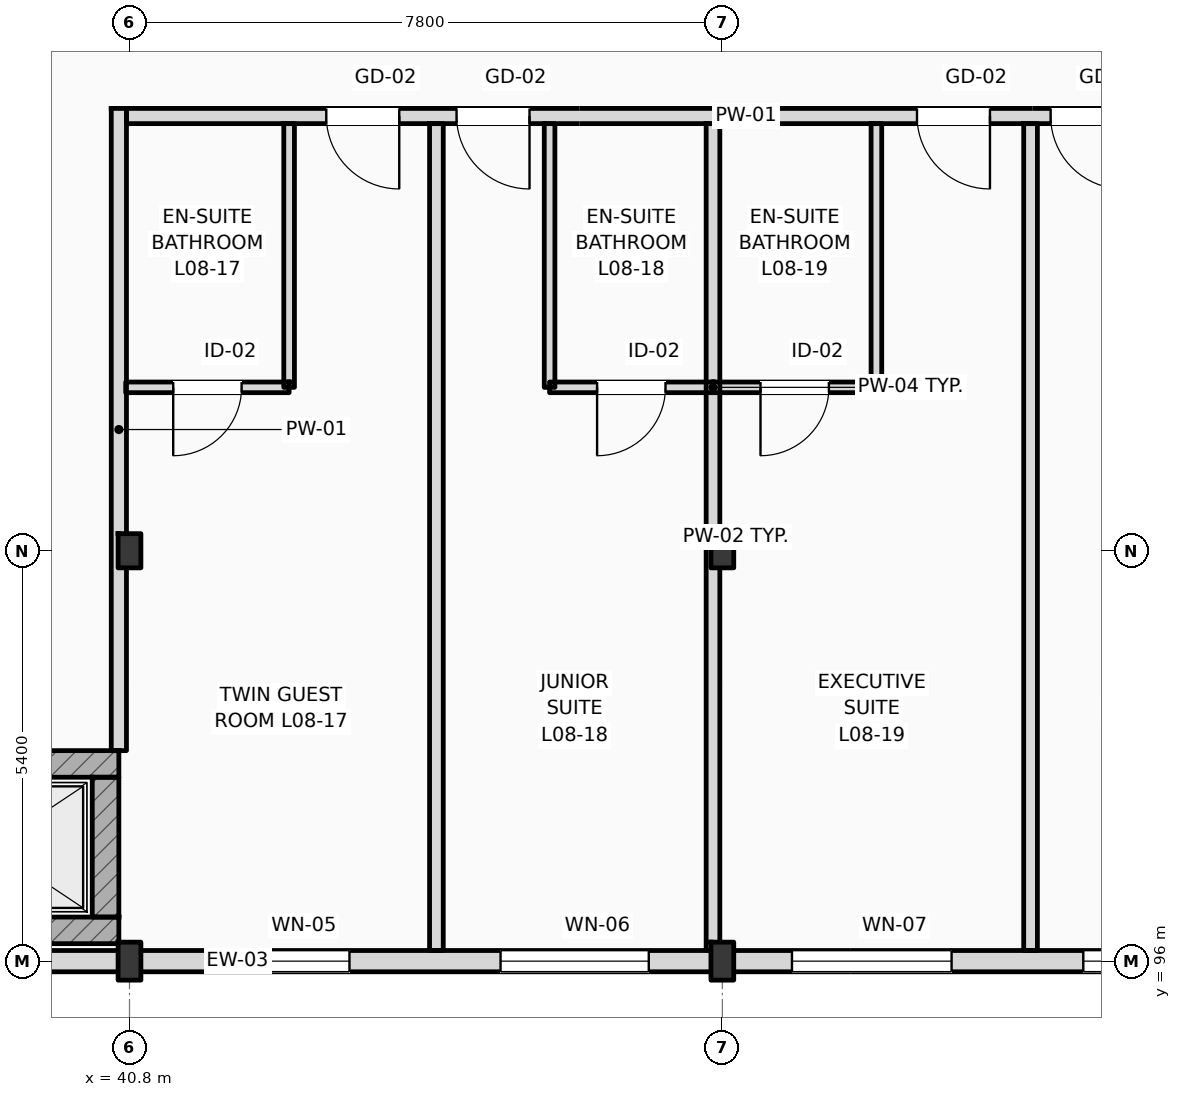
"""IFC4 building model, lengths in metres.
Left out: names, types, materials, properties, quantities, classifications, styles, units other than length and angle.
Written with IfcOpenShell. Run it as: python <this file> out.ifc"""

import sys

from ifc_helpers import new_model, si_unit, direction, frame, frame_2d, origin, origin_2d, place, context, subcontext, project, spatial, rectangle, i_section, extrude, element, fill, save


model = new_model("IFC4")
c1 = context("Model", 3, precision=1e-05, world=origin(), true_north=direction((0.0, 1.0)))
c2 = subcontext(c1, "Body", "Model", "MODEL_VIEW")
j1 = project(units=[si_unit("LENGTHUNIT", "METRE"), si_unit("PLANEANGLEUNIT", "RADIAN")], contexts=[c1])
p1 = place(None, origin())
s1 = spatial("IfcSite", under=j1, at=p1, CompositionType="ELEMENT")
p2 = place(p1, origin())
s2 = spatial("IfcBuilding", under=s1, at=p2, CompositionType="ELEMENT")
p3 = place(p2, frame((0.0, 0.0, 35.4)))
s3 = spatial("IfcBuildingStorey", under=s2, at=p3, CompositionType="ELEMENT", Elevation=35.4)
p4 = place(p3, frame((40.8, 96.0, 0.0), z_axis=(0.0, 0.0, 1.0), x_axis=(1.0, 0.0, 0.0)))
e1 = element("IfcColumn", 1, at=p4, inside=s3, PredefinedType="COLUMN", context=c2, shape_type="SweptSolid", body=[
    extrude(i_section(OverallWidth=0.3, OverallDepth=0.5, WebThickness=0.014, FlangeThickness=0.028, FilletRadius=0.027, at=origin_2d()), origin(), (0.0, 0.0, 1.0), 3.6),
])
p5 = place(p3, frame((40.8, 101.4, 0.0), z_axis=(0.0, 0.0, 1.0), x_axis=(1.0, 0.0, 0.0)))
e2 = element("IfcColumn", 2, at=p5, inside=s3, PredefinedType="COLUMN", context=c2, shape_type="SweptSolid", body=[
    extrude(i_section(OverallWidth=0.3, OverallDepth=0.45, WebThickness=0.014, FlangeThickness=0.026, FilletRadius=0.027, at=origin_2d()), origin(), (0.0, 0.0, 1.0), 3.6),
])
p6 = place(p3, frame((48.6, 96.0, 0.0), z_axis=(0.0, 0.0, 1.0), x_axis=(1.0, 0.0, 0.0)))
e3 = element("IfcColumn", 3, at=p6, inside=s3, PredefinedType="COLUMN", context=c2, shape_type="SweptSolid", body=[
    extrude(i_section(OverallWidth=0.3, OverallDepth=0.5, WebThickness=0.014, FlangeThickness=0.028, FilletRadius=0.027, at=origin_2d()), origin(), (0.0, 0.0, 1.0), 3.6),
])
p7 = place(p3, frame((48.6, 101.4, 0.0), z_axis=(0.0, 0.0, 1.0), x_axis=(1.0, 0.0, 0.0)))
e4 = element("IfcColumn", 4, at=p7, inside=s3, PredefinedType="COLUMN", context=c2, shape_type="SweptSolid", body=[
    extrude(i_section(OverallWidth=0.3, OverallDepth=0.45, WebThickness=0.014, FlangeThickness=0.026, FilletRadius=0.027, at=origin_2d()), origin(), (0.0, 0.0, 1.0), 3.6),
])
p8 = place(p3, frame((25.2, 96.0, 0.0), z_axis=(0.0, 0.0, 1.0), x_axis=(1.0, 0.0, 0.0)))
e5 = element("IfcWall", 5, at=p8, inside=s3, PredefinedType="STANDARD", context=c2, shape_type="SweptSolid", body=[
    extrude(rectangle(XDim=70.2, YDim=0.28, at=frame_2d((35.1, 0.0))), origin(), (0.0, 0.0, 1.0), 2.92),
])
p9 = place(p8, frame((16.694, 0.0, 0.9)))
e6 = element("IfcOpeningElement", 6, at=p9, cuts=e5, PredefinedType="OPENING", context=c2, shape_type="SweptSolid", body=[
    extrude(rectangle(XDim=1.8, YDim=1.84, at=frame_2d((0.9, 0.92))), frame((0.0, 0.15, 0.0), z_axis=(0.0, -1.0, 0.0), x_axis=(1.0, 0.0, 0.0)), (0.0, 0.0, 1.0), 0.3),
])
p10 = place(p8, frame((20.482, 0.0, 0.9)))
e7 = element("IfcOpeningElement", 7, at=p10, cuts=e5, PredefinedType="OPENING", context=c2, shape_type="SweptSolid", body=[
    extrude(rectangle(XDim=1.95, YDim=1.84, at=frame_2d((0.975, 0.92))), frame((0.0, 0.15, 0.0), z_axis=(0.0, -1.0, 0.0), x_axis=(1.0, 0.0, 0.0)), (0.0, 0.0, 1.0), 0.3),
])
p11 = place(p8, frame((24.316, 0.0, 0.9)))
e8 = element("IfcOpeningElement", 8, at=p11, cuts=e5, PredefinedType="OPENING", context=c2, shape_type="SweptSolid", body=[
    extrude(rectangle(XDim=2.1, YDim=1.84, at=frame_2d((1.05, 0.92))), frame((0.0, 0.15, 0.0), z_axis=(0.0, -1.0, 0.0), x_axis=(1.0, 0.0, 0.0)), (0.0, 0.0, 1.0), 0.3),
])
p12 = place(p8, frame((28.149, 0.0, 0.9)))
e9 = element("IfcOpeningElement", 9, at=p12, cuts=e5, PredefinedType="OPENING", context=c2, shape_type="SweptSolid", body=[
    extrude(rectangle(XDim=2.25, YDim=1.84, at=frame_2d((1.125, 0.92))), frame((0.0, 0.15, 0.0), z_axis=(0.0, -1.0, 0.0), x_axis=(1.0, 0.0, 0.0)), (0.0, 0.0, 1.0), 0.3),
])
p13 = place(p8, frame((31.983, 0.0, 0.9)))
e10 = element("IfcOpeningElement", 10, at=p13, cuts=e5, PredefinedType="OPENING", context=c2, shape_type="SweptSolid", body=[
    extrude(rectangle(XDim=2.4, YDim=1.84, at=frame_2d((1.2, 0.92))), frame((0.0, 0.15, 0.0), z_axis=(0.0, -1.0, 0.0), x_axis=(1.0, 0.0, 0.0)), (0.0, 0.0, 1.0), 0.3),
])
p14 = place(p8, frame((35.682, 0.0, 0.9)))
e11 = element("IfcOpeningElement", 11, at=p14, cuts=e5, PredefinedType="OPENING", context=c2, shape_type="SweptSolid", body=[
    extrude(rectangle(XDim=2.508, YDim=1.84, at=frame_2d((1.254, 0.92))), frame((0.0, 0.15, 0.0), z_axis=(0.0, -1.0, 0.0), x_axis=(1.0, 0.0, 0.0)), (0.0, 0.0, 1.0), 0.3),
])
p15 = place(p8, frame((55.56, 0.0, 0.9)))
e12 = element("IfcOpeningElement", 12, at=p15, cuts=e5, PredefinedType="OPENING", context=c2, shape_type="SweptSolid", body=[
    extrude(rectangle(XDim=1.8, YDim=1.84, at=frame_2d((0.9, 0.92))), frame((0.0, 0.15, 0.0), z_axis=(0.0, -1.0, 0.0), x_axis=(1.0, 0.0, 0.0)), (0.0, 0.0, 1.0), 0.3),
])
p16 = place(p8, frame((58.628, 0.0, 0.9)))
e13 = element("IfcOpeningElement", 13, at=p16, cuts=e5, PredefinedType="OPENING", context=c2, shape_type="SweptSolid", body=[
    extrude(rectangle(XDim=2.809, YDim=1.84, at=frame_2d((1.405, 0.92))), frame((0.0, 0.15, 0.0), z_axis=(0.0, -1.0, 0.0), x_axis=(1.0, 0.0, 0.0)), (0.0, 0.0, 1.0), 0.3),
])
p17 = place(p8, frame((63.257, 0.0, 0.9)))
e14 = element("IfcOpeningElement", 14, at=p17, cuts=e5, PredefinedType="OPENING", context=c2, shape_type="SweptSolid", body=[
    extrude(rectangle(XDim=1.8, YDim=1.84, at=frame_2d((0.9, 0.92))), frame((0.0, 0.15, 0.0), z_axis=(0.0, -1.0, 0.0), x_axis=(1.0, 0.0, 0.0)), (0.0, 0.0, 1.0), 0.3),
])
p18 = place(p8, frame((66.453, 0.0, 0.9)))
e15 = element("IfcOpeningElement", 15, at=p18, cuts=e5, PredefinedType="OPENING", context=c2, shape_type="SweptSolid", body=[
    extrude(rectangle(XDim=2.737, YDim=1.84, at=frame_2d((1.369, 0.92))), frame((0.0, 0.15, 0.0), z_axis=(0.0, -1.0, 0.0), x_axis=(1.0, 0.0, 0.0)), (0.0, 0.0, 1.0), 0.3),
])
p19 = place(p3, frame((37.67, 98.595, 0.0), z_axis=(0.0, 0.0, 1.0), x_axis=(1.0, 0.0, 0.0)))
e16 = element("IfcWall", 16, at=p19, inside=s3, PredefinedType="SHEAR", context=c2, shape_type="SweptSolid", body=[
    extrude(rectangle(XDim=2.99, YDim=0.35, at=frame_2d((1.495, 0.0))), origin(), (0.0, 0.0, 1.0), 3.38),
])
p20 = place(p19, frame((0.695, 0.0, 0.0)))
e17 = element("IfcOpeningElement", 17, at=p20, cuts=e16, PredefinedType="OPENING", context=c2, shape_type="SweptSolid", body=[
    extrude(rectangle(XDim=1.25, YDim=2.25, at=frame_2d((0.625, 1.125))), frame((0.0, 0.185, 0.0), z_axis=(0.0, -1.0, 0.0), x_axis=(1.0, 0.0, 0.0)), (0.0, 0.0, 1.0), 0.37),
])
p21 = place(p3, frame((37.67, 96.405, 0.0), z_axis=(0.0, 0.0, 1.0), x_axis=(1.0, 0.0, 0.0)))
e18 = element("IfcWall", 18, at=p21, inside=s3, PredefinedType="SHEAR", context=c2, shape_type="SweptSolid", body=[
    extrude(rectangle(XDim=2.99, YDim=0.35, at=frame_2d((1.495, 0.0))), origin(), (0.0, 0.0, 1.0), 3.38),
])
p22 = place(p3, frame((40.485, 96.58, 0.0), z_axis=(0.0, 0.0, 1.0), x_axis=(0.0, 1.0, 0.0)))
e19 = element("IfcWall", 19, at=p22, inside=s3, PredefinedType="SHEAR", context=c2, shape_type="SweptSolid", body=[
    extrude(rectangle(XDim=1.84, YDim=0.35, at=frame_2d((0.92, 0.0))), origin(), (0.0, 0.0, 1.0), 3.01),
])
p23 = place(p3, frame((40.76, 107.12, 0.0), z_axis=(0.0, 0.0, 1.0), x_axis=(1.0, 0.0, 0.0)))
e20 = element("IfcWall", 20, at=p23, inside=s3, PredefinedType="PARTITIONING", context=c2, shape_type="SweptSolid", body=[
    extrude(rectangle(XDim=23.44, YDim=0.2, at=frame_2d((11.72, 0.0))), origin(), (0.0, 0.0, 1.0), 3.38),
])
p24 = place(p23, frame((2.629, 0.0, 0.0)))
e21 = element("IfcOpeningElement", 21, at=p24, cuts=e20, PredefinedType="OPENING", context=c2, shape_type="SweptSolid", body=[
    extrude(rectangle(XDim=0.96, YDim=2.2, at=frame_2d((0.48, 1.1))), frame((0.0, 0.11, 0.0), z_axis=(0.0, -1.0, 0.0), x_axis=(1.0, 0.0, 0.0)), (0.0, 0.0, 1.0), 0.22),
])
p25 = place(p23, frame((4.343, 0.0, 0.0)))
e22 = element("IfcOpeningElement", 22, at=p25, cuts=e20, PredefinedType="OPENING", context=c2, shape_type="SweptSolid", body=[
    extrude(rectangle(XDim=0.96, YDim=2.2, at=frame_2d((0.48, 1.1))), frame((0.0, 0.11, 0.0), z_axis=(0.0, -1.0, 0.0), x_axis=(1.0, 0.0, 0.0)), (0.0, 0.0, 1.0), 0.22),
])
p26 = place(p23, frame((10.401, 0.0, 0.0)))
e23 = element("IfcOpeningElement", 23, at=p26, cuts=e20, PredefinedType="OPENING", context=c2, shape_type="SweptSolid", body=[
    extrude(rectangle(XDim=0.96, YDim=2.2, at=frame_2d((0.48, 1.1))), frame((0.0, 0.11, 0.0), z_axis=(0.0, -1.0, 0.0), x_axis=(1.0, 0.0, 0.0)), (0.0, 0.0, 1.0), 0.22),
])
p27 = place(p23, frame((12.159, 0.0, 0.0)))
e24 = element("IfcOpeningElement", 24, at=p27, cuts=e20, PredefinedType="OPENING", context=c2, shape_type="SweptSolid", body=[
    extrude(rectangle(XDim=0.96, YDim=2.2, at=frame_2d((0.48, 1.1))), frame((0.0, 0.11, 0.0), z_axis=(0.0, -1.0, 0.0), x_axis=(1.0, 0.0, 0.0)), (0.0, 0.0, 1.0), 0.22),
])
p28 = place(p23, frame((18.218, 0.0, 0.0)))
e25 = element("IfcOpeningElement", 25, at=p28, cuts=e20, PredefinedType="OPENING", context=c2, shape_type="SweptSolid", body=[
    extrude(rectangle(XDim=0.96, YDim=2.2, at=frame_2d((0.48, 1.1))), frame((0.0, 0.11, 0.0), z_axis=(0.0, -1.0, 0.0), x_axis=(1.0, 0.0, 0.0)), (0.0, 0.0, 1.0), 0.22),
])
p29 = place(p23, frame((20.021, 0.0, 0.0)))
e26 = element("IfcOpeningElement", 26, at=p29, cuts=e20, PredefinedType="OPENING", context=c2, shape_type="SweptSolid", body=[
    extrude(rectangle(XDim=0.96, YDim=2.2, at=frame_2d((0.48, 1.1))), frame((0.0, 0.11, 0.0), z_axis=(0.0, -1.0, 0.0), x_axis=(1.0, 0.0, 0.0)), (0.0, 0.0, 1.0), 0.22),
])
p30 = place(p3, frame((40.66, 98.77, 0.0), z_axis=(0.0, 0.0, 1.0), x_axis=(0.0, 1.0, 0.0)))
e27 = element("IfcWall", 27, at=p30, inside=s3, PredefinedType="PARTITIONING", context=c2, shape_type="SweptSolid", body=[
    extrude(rectangle(XDim=8.45, YDim=0.2, at=frame_2d((4.225, 0.0))), origin(), (0.0, 0.0, 1.0), 3.01),
])
p31 = place(p3, frame((44.838, 96.14, 0.0), z_axis=(0.0, 0.0, 1.0), x_axis=(0.0, 1.0, 0.0)))
e28 = element("IfcWall", 28, at=p31, inside=s3, PredefinedType="PARTITIONING", context=c2, shape_type="SweptSolid", body=[
    extrude(rectangle(XDim=10.88, YDim=0.18, at=frame_2d((5.44, 0.0))), origin(), (0.0, 0.0, 1.0), 3.38),
])
p32 = place(p3, frame((42.9, 103.55, 0.0), z_axis=(0.0, 0.0, 1.0), x_axis=(0.0, 1.0, 0.0)))
e29 = element("IfcWall", 29, at=p32, inside=s3, PredefinedType="PARTITIONING", context=c2, shape_type="SweptSolid", body=[
    extrude(rectangle(XDim=3.47, YDim=0.14, at=frame_2d((1.735, 0.0))), origin(), (0.0, 0.0, 1.0), 3.38),
])
p33 = place(p3, frame((40.75, 103.55, 0.0), z_axis=(0.0, 0.0, 1.0), x_axis=(1.0, 0.0, 0.0)))
e30 = element("IfcWall", 30, at=p33, inside=s3, PredefinedType="PARTITIONING", context=c2, shape_type="SweptSolid", body=[
    extrude(rectangle(XDim=2.15, YDim=0.14, at=frame_2d((1.075, 0.0))), origin(), (0.0, 0.0, 1.0), 3.38),
])
p34 = place(p33, frame((0.625, 0.0, 0.0)))
e31 = element("IfcOpeningElement", 31, at=p34, cuts=e30, PredefinedType="OPENING", context=c2, shape_type="SweptSolid", body=[
    extrude(rectangle(XDim=0.9, YDim=2.1, at=frame_2d((0.45, 1.05))), frame((0.0, 0.08, 0.0), z_axis=(0.0, -1.0, 0.0), x_axis=(1.0, 0.0, 0.0)), (0.0, 0.0, 1.0), 0.16),
])
p35 = place(p3, frame((48.477, 96.14, 0.0), z_axis=(0.0, 0.0, 1.0), x_axis=(0.0, 1.0, 0.0)))
e32 = element("IfcWall", 32, at=p35, inside=s3, PredefinedType="PARTITIONING", context=c2, shape_type="SweptSolid", body=[
    extrude(rectangle(XDim=10.88, YDim=0.18, at=frame_2d((5.44, 0.0))), origin(), (0.0, 0.0, 1.0), 3.01),
])
p36 = place(p3, frame((46.327, 103.55, 0.0), z_axis=(0.0, 0.0, 1.0), x_axis=(0.0, 1.0, 0.0)))
e33 = element("IfcWall", 33, at=p36, inside=s3, PredefinedType="PARTITIONING", context=c2, shape_type="SweptSolid", body=[
    extrude(rectangle(XDim=3.47, YDim=0.14, at=frame_2d((1.735, 0.0))), origin(), (0.0, 0.0, 1.0), 3.38),
])
p37 = place(p3, frame((46.327, 103.55, 0.0), z_axis=(0.0, 0.0, 1.0), x_axis=(1.0, 0.0, 0.0)))
e34 = element("IfcWall", 34, at=p37, inside=s3, PredefinedType="PARTITIONING", context=c2, shape_type="SweptSolid", body=[
    extrude(rectangle(XDim=2.15, YDim=0.14, at=frame_2d((1.075, 0.0))), origin(), (0.0, 0.0, 1.0), 3.38),
])
p38 = place(p37, frame((0.625, 0.0, 0.0)))
e35 = element("IfcOpeningElement", 35, at=p38, cuts=e34, PredefinedType="OPENING", context=c2, shape_type="SweptSolid", body=[
    extrude(rectangle(XDim=0.9, YDim=2.1, at=frame_2d((0.45, 1.05))), frame((0.0, 0.08, 0.0), z_axis=(0.0, -1.0, 0.0), x_axis=(1.0, 0.0, 0.0)), (0.0, 0.0, 1.0), 0.16),
])
p39 = place(p3, frame((52.655, 96.14, 0.0), z_axis=(0.0, 0.0, 1.0), x_axis=(0.0, 1.0, 0.0)))
e36 = element("IfcWall", 36, at=p39, inside=s3, PredefinedType="PARTITIONING", context=c2, shape_type="SweptSolid", body=[
    extrude(rectangle(XDim=10.88, YDim=0.18, at=frame_2d((5.44, 0.0))), origin(), (0.0, 0.0, 1.0), 3.38),
])
p40 = place(p3, frame((50.627, 103.55, 0.0), z_axis=(0.0, 0.0, 1.0), x_axis=(0.0, 1.0, 0.0)))
e37 = element("IfcWall", 37, at=p40, inside=s3, PredefinedType="PARTITIONING", context=c2, shape_type="SweptSolid", body=[
    extrude(rectangle(XDim=3.47, YDim=0.14, at=frame_2d((1.735, 0.0))), origin(), (0.0, 0.0, 1.0), 3.38),
])
p41 = place(p3, frame((48.477, 103.55, 0.0), z_axis=(0.0, 0.0, 1.0), x_axis=(1.0, 0.0, 0.0)))
e38 = element("IfcWall", 38, at=p41, inside=s3, PredefinedType="PARTITIONING", context=c2, shape_type="SweptSolid", body=[
    extrude(rectangle(XDim=2.15, YDim=0.14, at=frame_2d((1.075, 0.0))), origin(), (0.0, 0.0, 1.0), 3.38),
])
p42 = place(p41, frame((0.625, 0.0, 0.0)))
e39 = element("IfcOpeningElement", 39, at=p42, cuts=e38, PredefinedType="OPENING", context=c2, shape_type="SweptSolid", body=[
    extrude(rectangle(XDim=0.9, YDim=2.1, at=frame_2d((0.45, 1.05))), frame((0.0, 0.08, 0.0), z_axis=(0.0, -1.0, 0.0), x_axis=(1.0, 0.0, 0.0)), (0.0, 0.0, 1.0), 0.16),
])
p43 = place(p9, origin())
e40 = element("IfcWindow", 40, at=p43, inside=s3, PartitioningType="DOUBLE_PANEL_VERTICAL", PredefinedType="WINDOW", context=c2, shape_type="SweptSolid", body=[
    extrude(rectangle(XDim=1.8, YDim=1.84, at=frame_2d((0.9, 0.92))), frame((0.0, 0.03, 0.0), z_axis=(0.0, -1.0, 0.0), x_axis=(1.0, 0.0, 0.0)), (0.0, 0.0, 1.0), 0.06),
])
fill(e6, e40)
p44 = place(p10, origin())
e41 = element("IfcWindow", 41, at=p44, inside=s3, PartitioningType="DOUBLE_PANEL_VERTICAL", PredefinedType="WINDOW", context=c2, shape_type="SweptSolid", body=[
    extrude(rectangle(XDim=1.95, YDim=1.84, at=frame_2d((0.975, 0.92))), frame((0.0, 0.03, 0.0), z_axis=(0.0, -1.0, 0.0), x_axis=(1.0, 0.0, 0.0)), (0.0, 0.0, 1.0), 0.06),
])
fill(e7, e41)
p45 = place(p11, origin())
e42 = element("IfcWindow", 42, at=p45, inside=s3, PartitioningType="DOUBLE_PANEL_VERTICAL", PredefinedType="WINDOW", context=c2, shape_type="SweptSolid", body=[
    extrude(rectangle(XDim=2.1, YDim=1.84, at=frame_2d((1.05, 0.92))), frame((0.0, 0.03, 0.0), z_axis=(0.0, -1.0, 0.0), x_axis=(1.0, 0.0, 0.0)), (0.0, 0.0, 1.0), 0.06),
])
fill(e8, e42)
p46 = place(p12, origin())
e43 = element("IfcWindow", 43, at=p46, inside=s3, PartitioningType="DOUBLE_PANEL_VERTICAL", PredefinedType="WINDOW", context=c2, shape_type="SweptSolid", body=[
    extrude(rectangle(XDim=2.25, YDim=1.84, at=frame_2d((1.125, 0.92))), frame((0.0, 0.03, 0.0), z_axis=(0.0, -1.0, 0.0), x_axis=(1.0, 0.0, 0.0)), (0.0, 0.0, 1.0), 0.06),
])
fill(e9, e43)
p47 = place(p24, frame((0.96, 0.0, 0.0), z_axis=(0.0, 0.0, 1.0), x_axis=(-1.0, 0.0, 0.0)))
e44 = element("IfcDoor", 44, at=p47, inside=s3, OperationType="SINGLE_SWING_RIGHT", PredefinedType="DOOR", context=c2, shape_type="SweptSolid", body=[
    extrude(rectangle(XDim=0.96, YDim=2.2, at=frame_2d((0.48, 1.1))), frame((0.0, 0.025, 0.0), z_axis=(0.0, -1.0, 0.0), x_axis=(1.0, 0.0, 0.0)), (0.0, 0.0, 1.0), 0.05),
])
fill(e21, e44)
p48 = place(p34, frame((0.9, 0.0, 0.0), z_axis=(0.0, 0.0, 1.0), x_axis=(-1.0, 0.0, 0.0)))
e45 = element("IfcDoor", 45, at=p48, inside=s3, OperationType="SINGLE_SWING_LEFT", PredefinedType="DOOR", context=c2, shape_type="SweptSolid", body=[
    extrude(rectangle(XDim=0.9, YDim=2.1, at=frame_2d((0.45, 1.05))), frame((0.0, 0.025, 0.0), z_axis=(0.0, -1.0, 0.0), x_axis=(1.0, 0.0, 0.0)), (0.0, 0.0, 1.0), 0.05),
])
fill(e31, e45)
p49 = place(p25, frame((0.96, 0.0, 0.0), z_axis=(0.0, 0.0, 1.0), x_axis=(-1.0, 0.0, 0.0)))
e46 = element("IfcDoor", 46, at=p49, inside=s3, OperationType="SINGLE_SWING_RIGHT", PredefinedType="DOOR", context=c2, shape_type="SweptSolid", body=[
    extrude(rectangle(XDim=0.96, YDim=2.2, at=frame_2d((0.48, 1.1))), frame((0.0, 0.025, 0.0), z_axis=(0.0, -1.0, 0.0), x_axis=(1.0, 0.0, 0.0)), (0.0, 0.0, 1.0), 0.05),
])
fill(e22, e46)
p50 = place(p38, frame((0.9, 0.0, 0.0), z_axis=(0.0, 0.0, 1.0), x_axis=(-1.0, 0.0, 0.0)))
e47 = element("IfcDoor", 47, at=p50, inside=s3, OperationType="SINGLE_SWING_LEFT", PredefinedType="DOOR", context=c2, shape_type="SweptSolid", body=[
    extrude(rectangle(XDim=0.9, YDim=2.1, at=frame_2d((0.45, 1.05))), frame((0.0, 0.025, 0.0), z_axis=(0.0, -1.0, 0.0), x_axis=(1.0, 0.0, 0.0)), (0.0, 0.0, 1.0), 0.05),
])
fill(e35, e47)
p51 = place(p26, frame((0.96, 0.0, 0.0), z_axis=(0.0, 0.0, 1.0), x_axis=(-1.0, 0.0, 0.0)))
e48 = element("IfcDoor", 48, at=p51, inside=s3, OperationType="SINGLE_SWING_RIGHT", PredefinedType="DOOR", context=c2, shape_type="SweptSolid", body=[
    extrude(rectangle(XDim=0.96, YDim=2.2, at=frame_2d((0.48, 1.1))), frame((0.0, 0.025, 0.0), z_axis=(0.0, -1.0, 0.0), x_axis=(1.0, 0.0, 0.0)), (0.0, 0.0, 1.0), 0.05),
])
fill(e23, e48)
p52 = place(p42, frame((0.9, 0.0, 0.0), z_axis=(0.0, 0.0, 1.0), x_axis=(-1.0, 0.0, 0.0)))
e49 = element("IfcDoor", 49, at=p52, inside=s3, OperationType="SINGLE_SWING_LEFT", PredefinedType="DOOR", context=c2, shape_type="SweptSolid", body=[
    extrude(rectangle(XDim=0.9, YDim=2.1, at=frame_2d((0.45, 1.05))), frame((0.0, 0.025, 0.0), z_axis=(0.0, -1.0, 0.0), x_axis=(1.0, 0.0, 0.0)), (0.0, 0.0, 1.0), 0.05),
])
fill(e39, e49)
p53 = place(p27, frame((0.96, 0.0, 0.0), z_axis=(0.0, 0.0, 1.0), x_axis=(-1.0, 0.0, 0.0)))
e50 = element("IfcDoor", 50, at=p53, inside=s3, OperationType="SINGLE_SWING_RIGHT", PredefinedType="DOOR", context=c2, shape_type="SweptSolid", body=[
    extrude(rectangle(XDim=0.96, YDim=2.2, at=frame_2d((0.48, 1.1))), frame((0.0, 0.025, 0.0), z_axis=(0.0, -1.0, 0.0), x_axis=(1.0, 0.0, 0.0)), (0.0, 0.0, 1.0), 0.05),
])
fill(e24, e50)
save(model, sys.argv[1])
